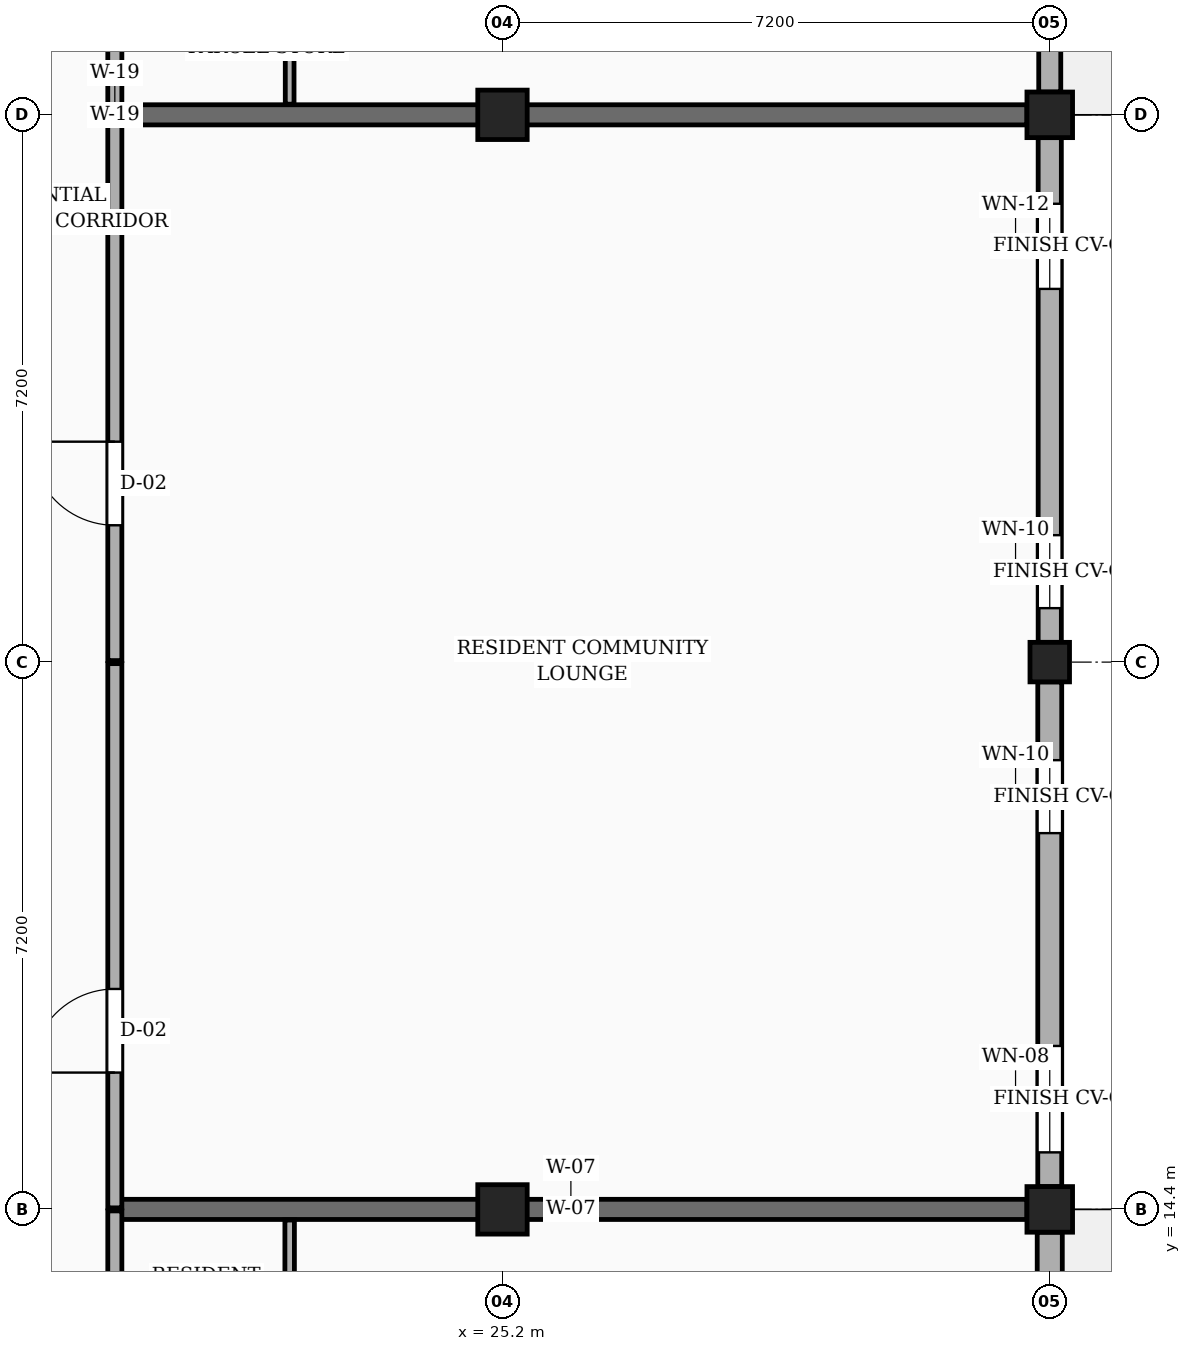
"""IFC4 building model, lengths in metres.
Left out: names, types, materials, properties, quantities, classifications, styles, units other than length and angle.
Written with IfcOpenShell. Run it as: python <this file> out.ifc"""

import sys

from ifc_helpers import new_model, si_unit, direction, frame, frame_2d, origin, origin_2d, place, context, subcontext, project, spatial, rectangle, circle, extrude, element, fill, save


model = new_model("IFC4")
c1 = context("Model", 3, precision=1e-05, world=origin(), true_north=direction((0.0, 1.0)))
c2 = subcontext(c1, "Body", "Model", "MODEL_VIEW")
j1 = project(units=[si_unit("LENGTHUNIT", "METRE"), si_unit("PLANEANGLEUNIT", "RADIAN")], contexts=[c1])
p1 = place(None, origin())
s1 = spatial("IfcSite", under=j1, at=p1, CompositionType="ELEMENT")
p2 = place(p1, origin())
s2 = spatial("IfcBuilding", under=s1, at=p2, CompositionType="ELEMENT")
p3 = place(p2, origin())
s3 = spatial("IfcBuildingStorey", under=s2, at=p3, CompositionType="ELEMENT", Elevation=0.0)
for number, where, z_axis, x_axis in (
    (1, (25.2, 14.4, 0.0), (0.0, 0.0, 1.0), (1.0, 0.0, 0.0)),
    (2, (25.2, 28.8, 0.0), (0.0, 0.0, 1.0), (1.0, 0.0, 0.0)),
):
    element("IfcColumn", number, at=place(p3, frame(where, z_axis=z_axis, x_axis=x_axis)), inside=s3, PredefinedType="COLUMN", context=c2, shape_type="SweptSolid", body=[
        extrude(rectangle(XDim=0.65, YDim=0.65, at=origin_2d()), origin(), (0.0, 0.0, 1.0), 4.5),
    ])
p4 = place(p3, frame((32.4, 14.4, 0.0), z_axis=(0.0, 0.0, 1.0), x_axis=(1.0, 0.0, 0.0)))
e3 = element("IfcColumn", 3, at=p4, inside=s3, PredefinedType="COLUMN", context=c2, shape_type="SweptSolid", body=[
    extrude(rectangle(XDim=0.6, YDim=0.6, at=origin_2d()), origin(), (0.0, 0.0, 1.0), 4.5),
])
p5 = place(p3, frame((32.4, 21.6, 0.0), z_axis=(0.0, 0.0, 1.0), x_axis=(1.0, 0.0, 0.0)))
e4 = element("IfcColumn", 4, at=p5, inside=s3, PredefinedType="COLUMN", context=c2, shape_type="SweptSolid", body=[
    extrude(circle(Radius=0.26, at=origin_2d()), origin(), (0.0, 0.0, 1.0), 4.5),
])
p6 = place(p3, frame((32.4, 28.8, 0.0), z_axis=(0.0, 0.0, 1.0), x_axis=(1.0, 0.0, 0.0)))
e5 = element("IfcColumn", 5, at=p6, inside=s3, PredefinedType="COLUMN", context=c2, shape_type="SweptSolid", body=[
    extrude(rectangle(XDim=0.6, YDim=0.6, at=origin_2d()), origin(), (0.0, 0.0, 1.0), 4.5),
])
for number, where, z_axis, x_axis in (
    (6, (20.1, 14.4, 0.0), (0.0, 0.0, 1.0), (1.0, 0.0, 0.0)),
    (7, (20.1, 28.8, 0.0), (0.0, 0.0, 1.0), (1.0, 0.0, 0.0)),
):
    element("IfcWall", number, at=place(p3, frame(where, z_axis=z_axis, x_axis=x_axis)), inside=s3, PredefinedType="SOLIDWALL", context=c2, shape_type="SweptSolid", body=[
        extrude(rectangle(XDim=12.0, YDim=0.265, at=frame_2d((6.0, 0.0))), origin(), (0.0, 0.0, 1.0), 3.52),
    ])
p7 = place(p3, frame((32.4, 7.5, 0.0), z_axis=(0.0, 0.0, 1.0), x_axis=(0.0, 1.0, 0.0)))
e8 = element("IfcWall", 8, at=p7, inside=s3, PredefinedType="SOLIDWALL", context=c2, shape_type="SweptSolid", body=[
    extrude(rectangle(XDim=6.6, YDim=0.33, at=frame_2d((3.3, 0.0))), origin(), (0.0, 0.0, 1.0), 3.79),
])
p8 = place(p7, frame((2.3, 0.0, 0.0)))
e9 = element("IfcOpeningElement", 9, at=p8, cuts=e8, PredefinedType="OPENING", context=c2, shape_type="SweptSolid", body=[
    extrude(rectangle(XDim=2.0, YDim=2.3, at=frame_2d((1.0, 1.15))), frame((0.0, 0.175, 0.0), z_axis=(0.0, -1.0, 0.0), x_axis=(1.0, 0.0, 0.0)), (0.0, 0.0, 1.0), 0.35),
])
p9 = place(p3, frame((32.4, 14.7, 0.0), z_axis=(0.0, 0.0, 1.0), x_axis=(0.0, 1.0, 0.0)))
e10 = element("IfcWall", 10, at=p9, inside=s3, PredefinedType="SOLIDWALL", context=c2, shape_type="SweptSolid", body=[
    extrude(rectangle(XDim=6.64, YDim=0.315, at=frame_2d((3.32, 0.0))), origin(), (0.0, 0.0, 1.0), 3.79),
])
p10 = place(p9, frame((0.45, 0.0, 0.78)))
e11 = element("IfcOpeningElement", 11, at=p10, cuts=e10, PredefinedType="OPENING", context=c2, shape_type="SweptSolid", body=[
    extrude(rectangle(XDim=1.4, YDim=1.15, at=frame_2d((0.7, 0.575))), frame((0.0, 0.167, 0.0), z_axis=(0.0, -1.0, 0.0), x_axis=(1.0, 0.0, 0.0)), (0.0, 0.0, 1.0), 0.335),
])
p11 = place(p9, frame((4.65, 0.0, 0.78)))
e12 = element("IfcOpeningElement", 12, at=p11, cuts=e10, PredefinedType="OPENING", context=c2, shape_type="SweptSolid", body=[
    extrude(rectangle(XDim=0.96, YDim=1.26, at=frame_2d((0.48, 0.63))), frame((0.0, 0.167, 0.0), z_axis=(0.0, -1.0, 0.0), x_axis=(1.0, 0.0, 0.0)), (0.0, 0.0, 1.0), 0.335),
])
p12 = place(p3, frame((32.4, 21.86, 0.0), z_axis=(0.0, 0.0, 1.0), x_axis=(0.0, 1.0, 0.0)))
e13 = element("IfcWall", 13, at=p12, inside=s3, PredefinedType="SOLIDWALL", context=c2, shape_type="SweptSolid", body=[
    extrude(rectangle(XDim=6.64, YDim=0.305, at=frame_2d((3.32, 0.0))), origin(), (0.0, 0.0, 1.0), 3.79),
])
p13 = place(p12, frame((0.45, 0.0, 0.78)))
e14 = element("IfcOpeningElement", 14, at=p13, cuts=e13, PredefinedType="OPENING", context=c2, shape_type="SweptSolid", body=[
    extrude(rectangle(XDim=0.96, YDim=1.26, at=frame_2d((0.48, 0.63))), frame((0.0, 0.163, 0.0), z_axis=(0.0, -1.0, 0.0), x_axis=(1.0, 0.0, 0.0)), (0.0, 0.0, 1.0), 0.325),
])
p14 = place(p12, frame((4.65, 0.0, 0.78)))
e15 = element("IfcOpeningElement", 15, at=p14, cuts=e13, PredefinedType="OPENING", context=c2, shape_type="SweptSolid", body=[
    extrude(rectangle(XDim=1.12, YDim=1.26, at=frame_2d((0.56, 0.63))), frame((0.0, 0.163, 0.0), z_axis=(0.0, -1.0, 0.0), x_axis=(1.0, 0.0, 0.0)), (0.0, 0.0, 1.0), 0.325),
])
p15 = place(p3, frame((32.4, 29.1, 0.0), z_axis=(0.0, 0.0, 1.0), x_axis=(0.0, 1.0, 0.0)))
e16 = element("IfcWall", 16, at=p15, inside=s3, PredefinedType="SOLIDWALL", context=c2, shape_type="SweptSolid", body=[
    extrude(rectangle(XDim=6.6, YDim=0.29, at=frame_2d((3.3, 0.0))), origin(), (0.0, 0.0, 1.0), 3.79),
])
p16 = place(p15, frame((2.2, 0.0, 0.0)))
e17 = element("IfcOpeningElement", 17, at=p16, cuts=e16, PredefinedType="OPENING", context=c2, shape_type="SweptSolid", body=[
    extrude(rectangle(XDim=2.2, YDim=2.35, at=frame_2d((1.1, 1.175))), frame((0.0, 0.155, 0.0), z_axis=(0.0, -1.0, 0.0), x_axis=(1.0, 0.0, 0.0)), (0.0, 0.0, 1.0), 0.31),
])
p17 = place(p3, frame((20.1, 7.375, 0.0), z_axis=(0.0, 0.0, 1.0), x_axis=(0.0, 1.0, 0.0)))
e18 = element("IfcWall", 18, at=p17, inside=s3, PredefinedType="PARTITIONING", context=c2, shape_type="SweptSolid", body=[
    extrude(rectangle(XDim=7.005, YDim=0.185, at=frame_2d((3.502, 0.0))), origin(), (0.0, 0.0, 1.0), 3.655),
])
p18 = place(p17, frame((1.375, 0.0, 0.0)))
e19 = element("IfcOpeningElement", 19, at=p18, cuts=e18, PredefinedType="OPENING", context=c2, shape_type="SweptSolid", body=[
    extrude(rectangle(XDim=1.1, YDim=2.15, at=frame_2d((0.55, 1.075))), frame((0.0, 0.103, 0.0), z_axis=(0.0, -1.0, 0.0), x_axis=(1.0, 0.0, 0.0)), (0.0, 0.0, 1.0), 0.205),
])
p19 = place(p3, frame((20.1, 14.42, 0.0), z_axis=(0.0, 0.0, 1.0), x_axis=(0.0, 1.0, 0.0)))
e20 = element("IfcWall", 20, at=p19, inside=s3, PredefinedType="PARTITIONING", context=c2, shape_type="SweptSolid", body=[
    extrude(rectangle(XDim=7.16, YDim=0.185, at=frame_2d((3.58, 0.0))), origin(), (0.0, 0.0, 1.0), 3.655),
])
p20 = place(p19, frame((1.78, 0.0, 0.0)))
e21 = element("IfcOpeningElement", 21, at=p20, cuts=e20, PredefinedType="OPENING", context=c2, shape_type="SweptSolid", body=[
    extrude(rectangle(XDim=1.1, YDim=2.15, at=frame_2d((0.55, 1.075))), frame((0.0, 0.103, 0.0), z_axis=(0.0, -1.0, 0.0), x_axis=(1.0, 0.0, 0.0)), (0.0, 0.0, 1.0), 0.205),
])
p21 = place(p3, frame((20.1, 21.62, 0.0), z_axis=(0.0, 0.0, 1.0), x_axis=(0.0, 1.0, 0.0)))
e22 = element("IfcWall", 22, at=p21, inside=s3, PredefinedType="PARTITIONING", context=c2, shape_type="SweptSolid", body=[
    extrude(rectangle(XDim=7.16, YDim=0.185, at=frame_2d((3.58, 0.0))), origin(), (0.0, 0.0, 1.0), 3.655),
])
p22 = place(p21, frame((1.78, 0.0, 0.0)))
e23 = element("IfcOpeningElement", 23, at=p22, cuts=e22, PredefinedType="OPENING", context=c2, shape_type="SweptSolid", body=[
    extrude(rectangle(XDim=1.1, YDim=2.15, at=frame_2d((0.55, 1.075))), frame((0.0, 0.103, 0.0), z_axis=(0.0, -1.0, 0.0), x_axis=(1.0, 0.0, 0.0)), (0.0, 0.0, 1.0), 0.205),
])
p23 = place(p3, frame((20.1, 28.82, 0.0), z_axis=(0.0, 0.0, 1.0), x_axis=(0.0, 1.0, 0.0)))
e24 = element("IfcWall", 24, at=p23, inside=s3, PredefinedType="PARTITIONING", context=c2, shape_type="SweptSolid", body=[
    extrude(rectangle(XDim=7.16, YDim=0.185, at=frame_2d((3.58, 0.0))), origin(), (0.0, 0.0, 1.0), 3.655),
])
p24 = place(p23, frame((4.33, 0.0, 0.0)))
e25 = element("IfcOpeningElement", 25, at=p24, cuts=e24, PredefinedType="OPENING", context=c2, shape_type="SweptSolid", body=[
    extrude(rectangle(XDim=1.1, YDim=2.15, at=frame_2d((0.55, 1.075))), frame((0.0, 0.103, 0.0), z_axis=(0.0, -1.0, 0.0), x_axis=(1.0, 0.0, 0.0)), (0.0, 0.0, 1.0), 0.205),
])
p25 = place(p3, frame((22.4, 11.85, 0.0), z_axis=(0.0, 0.0, 1.0), x_axis=(0.0, 1.0, 0.0)))
e26 = element("IfcWall", 26, at=p25, inside=s3, PredefinedType="PARTITIONING", context=c2, shape_type="SweptSolid", body=[
    extrude(rectangle(XDim=2.41, YDim=0.125, at=frame_2d((1.205, 0.0))), origin(), (0.0, 0.0, 1.0), 3.655),
])
p26 = place(p3, frame((22.4, 28.94, 0.0), z_axis=(0.0, 0.0, 1.0), x_axis=(0.0, 1.0, 0.0)))
e27 = element("IfcWall", 27, at=p26, inside=s3, PredefinedType="PARTITIONING", context=c2, shape_type="SweptSolid", body=[
    extrude(rectangle(XDim=2.41, YDim=0.115, at=frame_2d((1.205, 0.0))), origin(), (0.0, 0.0, 1.0), 3.655),
])
p27 = place(p10, origin())
e28 = element("IfcWindow", 28, at=p27, inside=s3, PartitioningType="SINGLE_PANEL", PredefinedType="WINDOW", context=c2, shape_type="SweptSolid", body=[
    extrude(rectangle(XDim=1.4, YDim=1.15, at=frame_2d((0.7, 0.575))), frame((0.0, 0.03, 0.0), z_axis=(0.0, -1.0, 0.0), x_axis=(1.0, 0.0, 0.0)), (0.0, 0.0, 1.0), 0.06),
])
fill(e11, e28)
p28 = place(p11, origin())
e29 = element("IfcWindow", 29, at=p28, inside=s3, PartitioningType="SINGLE_PANEL", PredefinedType="WINDOW", context=c2, shape_type="SweptSolid", body=[
    extrude(rectangle(XDim=0.96, YDim=1.26, at=frame_2d((0.48, 0.63))), frame((0.0, 0.03, 0.0), z_axis=(0.0, -1.0, 0.0), x_axis=(1.0, 0.0, 0.0)), (0.0, 0.0, 1.0), 0.06),
])
fill(e12, e29)
p29 = place(p13, origin())
e30 = element("IfcWindow", 30, at=p29, inside=s3, PartitioningType="SINGLE_PANEL", PredefinedType="WINDOW", context=c2, shape_type="SweptSolid", body=[
    extrude(rectangle(XDim=0.96, YDim=1.26, at=frame_2d((0.48, 0.63))), frame((0.0, 0.03, 0.0), z_axis=(0.0, -1.0, 0.0), x_axis=(1.0, 0.0, 0.0)), (0.0, 0.0, 1.0), 0.06),
])
fill(e14, e30)
p30 = place(p14, origin())
e31 = element("IfcWindow", 31, at=p30, inside=s3, PartitioningType="SINGLE_PANEL", PredefinedType="WINDOW", context=c2, shape_type="SweptSolid", body=[
    extrude(rectangle(XDim=1.12, YDim=1.26, at=frame_2d((0.56, 0.63))), frame((0.0, 0.03, 0.0), z_axis=(0.0, -1.0, 0.0), x_axis=(1.0, 0.0, 0.0)), (0.0, 0.0, 1.0), 0.06),
])
fill(e15, e31)
p31 = place(p20, origin())
e32 = element("IfcDoor", 32, at=p31, inside=s3, OperationType="SINGLE_SWING_LEFT", PredefinedType="DOOR", context=c2, shape_type="SweptSolid", body=[
    extrude(rectangle(XDim=1.1, YDim=2.15, at=frame_2d((0.55, 1.075))), frame((0.0, 0.025, 0.0), z_axis=(0.0, -1.0, 0.0), x_axis=(1.0, 0.0, 0.0)), (0.0, 0.0, 1.0), 0.05),
])
fill(e21, e32)
p32 = place(p22, origin())
e33 = element("IfcDoor", 33, at=p32, inside=s3, OperationType="SINGLE_SWING_RIGHT", PredefinedType="DOOR", context=c2, shape_type="SweptSolid", body=[
    extrude(rectangle(XDim=1.1, YDim=2.15, at=frame_2d((0.55, 1.075))), frame((0.0, 0.025, 0.0), z_axis=(0.0, -1.0, 0.0), x_axis=(1.0, 0.0, 0.0)), (0.0, 0.0, 1.0), 0.05),
])
fill(e23, e33)
save(model, sys.argv[1])
